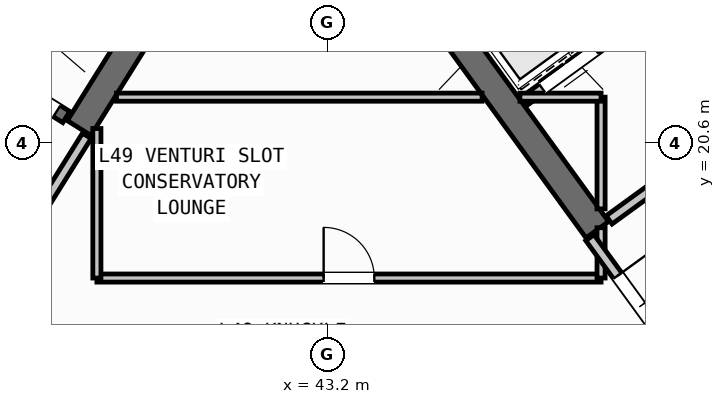
"""IFC4 building model, lengths in metres.
Left out: names, types, materials, properties, quantities, classifications, styles, units other than length and angle.
Written with IfcOpenShell. Run it as: python <this file> out.ifc"""

import sys

from ifc_helpers import new_model, si_unit, direction, frame, frame_2d, origin, place, context, subcontext, project, spatial, rectangle, extrude, source, transform, mapped, element, fill, save


model = new_model("IFC4")
c1 = context("Model", 3, precision=1e-05, world=origin(), true_north=direction((0.0, 1.0)))
c2 = subcontext(c1, "Body", "Model", "MODEL_VIEW")
j1 = project(units=[si_unit("LENGTHUNIT", "METRE"), si_unit("PLANEANGLEUNIT", "RADIAN")], contexts=[c1])
p1 = place(None, origin())
s1 = spatial("IfcSite", under=j1, at=p1, CompositionType="ELEMENT")
p2 = place(p1, origin())
s2 = spatial("IfcBuilding", under=s1, at=p2, CompositionType="ELEMENT")
p3 = place(p2, frame((0.0, 0.0, 195.0)))
s3 = spatial("IfcBuildingStorey", under=s2, at=p3, CompositionType="ELEMENT", Elevation=195.0)
p4 = place(p3, frame((40.194, 23.922, 0.0), z_axis=(0.0, 0.0, 1.0), x_axis=(-0.529888438328, -0.848067357541, 0.0)))
e1 = element("IfcWall", 1, at=p4, inside=s3, PredefinedType="SHEAR", context=c2, shape_type="SweptSolid", body=[
    extrude(rectangle(XDim=3.575, YDim=0.55, at=frame_2d((1.788, 0.0))), origin(), (0.0, 0.0, 1.0), 4.22),
])
p5 = place(p3, frame((48.526, 18.884, 0.0), z_axis=(0.0, 0.0, 1.0), x_axis=(-0.587764933797, 0.809031756236, 0.0)))
e2 = element("IfcWall", 2, at=p5, inside=s3, PredefinedType="SHEAR", context=c2, shape_type="SweptSolid", body=[
    extrude(rectangle(XDim=6.425, YDim=0.55, at=frame_2d((3.212, 0.0))), origin(), (0.0, 0.0, 1.0), 4.22),
])
p6 = place(p3, frame((38.046, 21.108, 0.0), z_axis=(0.0, 0.0, 1.0), x_axis=(-0.848054434086, 0.529909121291, 0.0)))
e3 = element("IfcWall", 3, at=p6, inside=s3, PredefinedType="SHEAR", context=c2, shape_type="SweptSolid", body=[
    extrude(rectangle(XDim=7.33, YDim=0.26, at=frame_2d((3.665, 0.0))), origin(), (0.0, 0.0, 1.0), 4.22),
])
p7 = place(p6, frame((0.22, 0.0, 0.0)))
e4 = element("IfcOpeningElement", 4, at=p7, cuts=e3, PredefinedType="OPENING", context=c2, shape_type="SweptSolid", body=[
    extrude(rectangle(XDim=1.1, YDim=2.1, at=frame_2d((0.55, 1.05))), frame((0.0, 0.14, 0.0), z_axis=(0.0, -1.0, 0.0), x_axis=(1.0, 0.0, 0.0)), (0.0, 0.0, 1.0), 0.28),
])
p8 = place(p3, frame((47.065, 21.407, 0.0), z_axis=(0.0, 0.0, 1.0), x_axis=(0.809032984992, 0.587763242466, 0.0)))
e5 = element("IfcWall", 5, at=p8, inside=s3, PredefinedType="STANDARD", context=c2, shape_type="SweptSolid", body=[
    extrude(rectangle(XDim=3.448, YDim=0.2, at=frame_2d((1.724, 0.0))), origin(), (0.0, 0.0, 1.0), 4.21),
])
p9 = place(p8, frame((0.458, 0.0, 0.0)))
e6 = element("IfcOpeningElement", 6, at=p9, cuts=e5, PredefinedType="OPENING", context=c2, shape_type="SweptSolid", body=[
    extrude(rectangle(XDim=1.3, YDim=2.2, at=frame_2d((0.65, 1.1))), frame((0.0, 0.11, 0.0), z_axis=(0.0, -1.0, 0.0), x_axis=(1.0, 0.0, 0.0)), (0.0, 0.0, 1.0), 0.22),
])
p10 = place(p3, frame((48.758, 19.077, 0.0), z_axis=(0.0, 0.0, 1.0), x_axis=(0.809005065155, 0.587801671104, 0.0)))
e7 = element("IfcWall", 7, at=p10, inside=s3, PredefinedType="STANDARD", context=c2, shape_type="SweptSolid", body=[
    extrude(rectangle(XDim=5.768, YDim=0.2, at=frame_2d((2.884, 0.0))), origin(), (0.0, 0.0, 1.0), 4.21),
])
p11 = place(p10, frame((2.548, 0.0, 0.0)))
e8 = element("IfcOpeningElement", 8, at=p11, cuts=e7, PredefinedType="OPENING", context=c2, shape_type="SweptSolid", body=[
    extrude(rectangle(XDim=1.15, YDim=2.1, at=frame_2d((0.575, 1.05))), frame((0.0, 0.11, 0.0), z_axis=(0.0, -1.0, 0.0), x_axis=(1.0, 0.0, 0.0)), (0.0, 0.0, 1.0), 0.22),
])
p12 = place(p3, frame((38.451, 20.737, 0.0), z_axis=(0.0, 0.0, 1.0), x_axis=(-0.529924799939, -0.848044637038, 0.0)))
e9 = element("IfcWall", 9, at=p12, inside=s3, PredefinedType="STANDARD", context=c2, shape_type="SweptSolid", body=[
    extrude(rectangle(XDim=2.96, YDim=0.2, at=frame_2d((1.48, 0.0))), origin(), (0.0, 0.0, 1.0), 4.21),
])
p13 = place(p12, frame((1.46, 0.0, 0.0)))
e10 = element("IfcOpeningElement", 10, at=p13, cuts=e9, PredefinedType="OPENING", context=c2, shape_type="SweptSolid", body=[
    extrude(rectangle(XDim=0.86, YDim=2.05, at=frame_2d((0.43, 1.025))), frame((0.0, 0.11, 0.0), z_axis=(0.0, -1.0, 0.0), x_axis=(1.0, 0.0, 0.0)), (0.0, 0.0, 1.0), 0.22),
])
p14 = place(p3, frame((38.65, 17.93, 0.0), z_axis=(0.0, 0.0, 1.0), x_axis=(1.0, 0.0, 0.0)))
e11 = element("IfcWall", 11, at=p14, inside=s3, PredefinedType="PARTITIONING", context=c2, shape_type="SweptSolid", body=[
    extrude(rectangle(XDim=9.95, YDim=0.16, at=frame_2d((4.975, 0.0))), origin(), (0.0, 0.0, 1.0), 4.21),
])
p15 = place(p14, frame((4.475, 0.0, 0.0)))
e12 = element("IfcOpeningElement", 12, at=p15, cuts=e11, PredefinedType="OPENING", context=c2, shape_type="SweptSolid", body=[
    extrude(rectangle(XDim=1.0, YDim=2.1, at=frame_2d((0.5, 1.05))), frame((0.0, 0.09, 0.0), z_axis=(0.0, -1.0, 0.0), x_axis=(1.0, 0.0, 0.0)), (0.0, 0.0, 1.0), 0.18),
])
p16 = place(p3, frame((38.65, 17.93, 0.0), z_axis=(0.0, 0.0, 1.0), x_axis=(0.0, 1.0, 0.0)))
e13 = element("IfcWall", 13, at=p16, inside=s3, PredefinedType="PARTITIONING", context=c2, shape_type="SweptSolid", body=[
    extrude(rectangle(XDim=2.951, YDim=0.16, at=frame_2d((1.476, 0.0))), origin(), (0.0, 0.0, 1.0), 4.21),
])
p17 = place(p3, frame((48.6, 17.93, 0.0), z_axis=(0.0, 0.0, 1.0), x_axis=(0.0, 1.0, 0.0)))
e14 = element("IfcWall", 14, at=p17, inside=s3, PredefinedType="PARTITIONING", context=c2, shape_type="SweptSolid", body=[
    extrude(rectangle(XDim=0.993, YDim=0.16, at=frame_2d((0.496, 0.0))), origin(), (0.0, 0.0, 1.0), 4.21),
])
p18 = place(p3, frame((48.6, 19.295, 0.0), z_axis=(0.0, 0.0, 1.0), x_axis=(0.0, 1.0, 0.0)))
e15 = element("IfcWall", 15, at=p18, inside=s3, PredefinedType="PARTITIONING", context=c2, shape_type="SweptSolid", body=[
    extrude(rectangle(XDim=2.205, YDim=0.16, at=frame_2d((1.103, 0.0))), origin(), (0.0, 0.0, 1.0), 4.21),
])
p19 = place(p3, frame((39.037, 21.5, 0.0), z_axis=(0.0, 0.0, 1.0), x_axis=(1.0, 0.0, 0.0)))
e16 = element("IfcWall", 16, at=p19, inside=s3, PredefinedType="PARTITIONING", context=c2, shape_type="SweptSolid", body=[
    extrude(rectangle(XDim=7.215, YDim=0.16, at=frame_2d((3.607, 0.0))), origin(), (0.0, 0.0, 1.0), 4.21),
])
p20 = place(p3, frame((46.998, 21.5, 0.0), z_axis=(0.0, 0.0, 1.0), x_axis=(1.0, 0.0, 0.0)))
e17 = element("IfcWall", 17, at=p20, inside=s3, PredefinedType="PARTITIONING", context=c2, shape_type="SweptSolid", body=[
    extrude(rectangle(XDim=1.602, YDim=0.16, at=frame_2d((0.801, 0.0))), origin(), (0.0, 0.0, 1.0), 4.21),
])
p21 = place(p3, frame((50.119, 16.333, 0.0), z_axis=(0.0, 0.0, 1.0), x_axis=(-0.587749856981, 0.809042709391, 0.0)))
e18 = element("IfcWall", 18, at=p21, inside=s3, PredefinedType="STANDARD", context=c2, shape_type="SweptSolid", body=[
    extrude(rectangle(XDim=2.96, YDim=0.2, at=frame_2d((1.48, 0.0))), origin(), (0.0, 0.0, 1.0), 4.21),
])
p22 = place(p21, frame((0.53, 0.0, 0.0)))
e19 = element("IfcOpeningElement", 19, at=p22, cuts=e18, PredefinedType="OPENING", context=c2, shape_type="SweptSolid", body=[
    extrude(rectangle(XDim=1.5, YDim=2.15, at=frame_2d((0.75, 1.075))), frame((0.0, 0.11, 0.0), z_axis=(0.0, -1.0, 0.0), x_axis=(1.0, 0.0, 0.0)), (0.0, 0.0, 1.0), 0.22),
])
m1 = source(origin(), c2, "Body", "SweptSolid", [
    extrude(rectangle(XDim=1.1, YDim=2.1, at=frame_2d((0.55, 1.05))), frame((0.0, 0.025, 0.0), z_axis=(0.0, -1.0, 0.0), x_axis=(1.0, 0.0, 0.0)), (0.0, 0.0, 1.0), 0.05),
])
p23 = place(p7, origin())
e20 = element("IfcDoor", 20, at=p23, inside=s3, OperationType="SINGLE_SWING_RIGHT", PredefinedType="DOOR", context=c2, shape_type="MappedRepresentation", body=[
    mapped(m1, transform((0.0, 0.0, 0.0), scale=1.0)),
])
fill(e4, e20)
m2 = source(origin(), c2, "Body", "SweptSolid", [
    extrude(rectangle(XDim=1.3, YDim=2.2, at=frame_2d((0.65, 1.1))), frame((0.0, 0.025, 0.0), z_axis=(0.0, -1.0, 0.0), x_axis=(1.0, 0.0, 0.0)), (0.0, 0.0, 1.0), 0.05),
])
p24 = place(p9, origin())
e21 = element("IfcDoor", 21, at=p24, inside=s3, OperationType="DOUBLE_DOOR_SLIDING", PredefinedType="DOOR", context=c2, shape_type="MappedRepresentation", body=[
    mapped(m2, transform((0.0, 0.0, 0.0), scale=1.0)),
])
fill(e6, e21)
m3 = source(origin(), c2, "Body", "SweptSolid", [
    extrude(rectangle(XDim=1.0, YDim=2.1, at=frame_2d((0.5, 1.05))), frame((0.0, 0.025, 0.0), z_axis=(0.0, -1.0, 0.0), x_axis=(1.0, 0.0, 0.0)), (0.0, 0.0, 1.0), 0.05),
])
p25 = place(p15, origin())
e22 = element("IfcDoor", 22, at=p25, inside=s3, OperationType="SINGLE_SWING_LEFT", PredefinedType="DOOR", context=c2, shape_type="MappedRepresentation", body=[
    mapped(m3, transform((0.0, 0.0, 0.0), scale=1.0)),
])
fill(e12, e22)
m4 = source(origin(), c2, "Body", "SweptSolid", [
    extrude(rectangle(XDim=1.5, YDim=2.15, at=frame_2d((0.75, 1.075))), frame((0.0, 0.025, 0.0), z_axis=(0.0, -1.0, 0.0), x_axis=(1.0, 0.0, 0.0)), (0.0, 0.0, 1.0), 0.05),
])
p26 = place(p22, frame((1.5, 0.0, 0.0), z_axis=(0.0, 0.0, 1.0), x_axis=(-1.0, 0.0, 0.0)))
e23 = element("IfcDoor", 23, at=p26, inside=s3, OperationType="DOUBLE_DOOR_SINGLE_SWING", PredefinedType="DOOR", context=c2, shape_type="MappedRepresentation", body=[
    mapped(m4, transform((0.0, 0.0, 0.0), scale=1.0)),
])
fill(e19, e23)
save(model, sys.argv[1])
